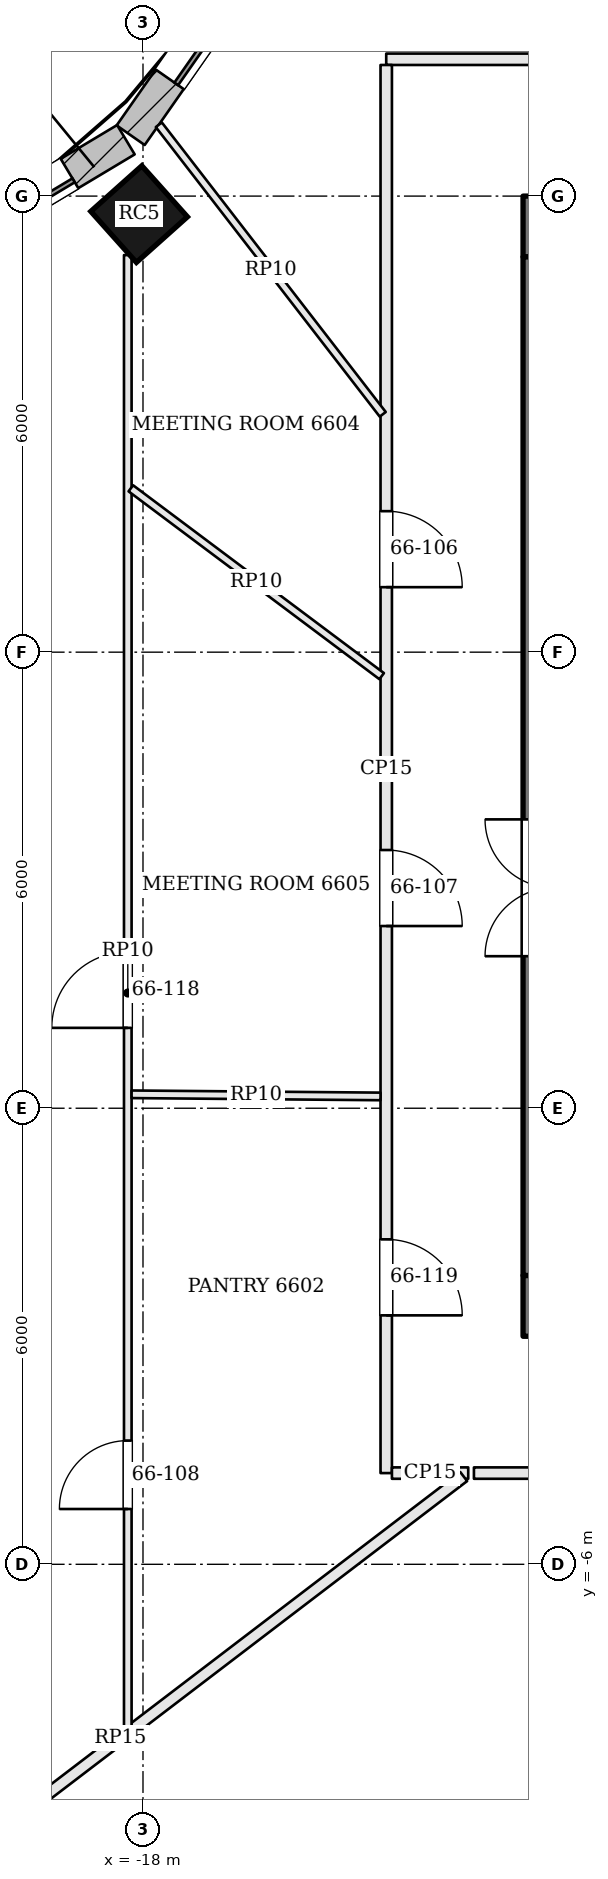
"""IFC4 building model, lengths in metres.
Left out: names, types, materials, properties, quantities, classifications, styles, units other than length and angle.
Written with IfcOpenShell. Run it as: python <this file> out.ifc"""

import sys

from ifc_helpers import new_model, si_unit, direction, frame, frame_2d, origin, origin_2d, place, context, subcontext, project, spatial, rectangle, extrude, element, fill, save


model = new_model("IFC4")
c1 = context("Model", 3, precision=1e-05, world=origin(), true_north=direction((0.0, 1.0)))
c2 = subcontext(c1, "Body", "Model", "MODEL_VIEW")
j1 = project(units=[si_unit("LENGTHUNIT", "METRE"), si_unit("PLANEANGLEUNIT", "RADIAN")], contexts=[c1])
p1 = place(None, origin())
s1 = spatial("IfcSite", under=j1, at=p1, CompositionType="ELEMENT")
p2 = place(p1, origin())
s2 = spatial("IfcBuilding", under=s1, at=p2, CompositionType="ELEMENT")
p3 = place(p2, frame((0.0, 0.0, 268.8)))
s3 = spatial("IfcBuildingStorey", under=s2, at=p3, CompositionType="ELEMENT", Elevation=268.8)
p4 = place(p3, frame((-13.0, 11.6, 0.0), z_axis=(0.0, 0.0, 1.0), x_axis=(1.0, 0.0, 0.0)))
e1 = element("IfcWall", 1, at=p4, inside=s3, PredefinedType="SHEAR", context=c2, shape_type="SweptSolid", body=[
    extrude(rectangle(XDim=26.0, YDim=0.8, at=frame_2d((13.0, 0.0))), origin(), (0.0, 0.0, 1.0), 3.9),
])
p5 = place(p4, frame((8.825, 0.0, 0.0)))
e2 = element("IfcOpeningElement", 2, at=p5, cuts=e1, PredefinedType="OPENING", context=c2, shape_type="SweptSolid", body=[
    extrude(rectangle(XDim=1.0, YDim=2.1, at=frame_2d((0.5, 1.05))), frame((0.0, 0.41, 0.0), z_axis=(0.0, -1.0, 0.0), x_axis=(1.0, 0.0, 0.0)), (0.0, 0.0, 1.0), 0.82),
])
p6 = place(p4, frame((11.825, 0.0, 0.0)))
e3 = element("IfcOpeningElement", 3, at=p6, cuts=e1, PredefinedType="OPENING", context=c2, shape_type="SweptSolid", body=[
    extrude(rectangle(XDim=0.7, YDim=2.1, at=frame_2d((0.35, 1.05))), frame((0.0, 0.41, 0.0), z_axis=(0.0, -1.0, 0.0), x_axis=(1.0, 0.0, 0.0)), (0.0, 0.0, 1.0), 0.82),
])
p7 = place(p4, frame((14.275, 0.0, 0.0)))
e4 = element("IfcOpeningElement", 4, at=p7, cuts=e1, PredefinedType="OPENING", context=c2, shape_type="SweptSolid", body=[
    extrude(rectangle(XDim=0.7, YDim=2.1, at=frame_2d((0.35, 1.05))), frame((0.0, 0.41, 0.0), z_axis=(0.0, -1.0, 0.0), x_axis=(1.0, 0.0, 0.0)), (0.0, 0.0, 1.0), 0.82),
])
p8 = place(p4, frame((16.175, 0.0, 0.0)))
e5 = element("IfcOpeningElement", 5, at=p8, cuts=e1, PredefinedType="OPENING", context=c2, shape_type="SweptSolid", body=[
    extrude(rectangle(XDim=1.0, YDim=2.1, at=frame_2d((0.5, 1.05))), frame((0.0, 0.41, 0.0), z_axis=(0.0, -1.0, 0.0), x_axis=(1.0, 0.0, 0.0)), (0.0, 0.0, 1.0), 0.82),
])
p9 = place(p3, frame((-13.0, -2.6, 0.0), z_axis=(0.0, 0.0, 1.0), x_axis=(1.0, 0.0, 0.0)))
e6 = element("IfcWall", 6, at=p9, inside=s3, PredefinedType="SHEAR", context=c2, shape_type="SweptSolid", body=[
    extrude(rectangle(XDim=26.0, YDim=0.8, at=frame_2d((13.0, 0.0))), origin(), (0.0, 0.0, 1.0), 3.9),
])
p10 = place(p9, frame((9.2, 0.0, 0.0)))
e7 = element("IfcOpeningElement", 7, at=p10, cuts=e6, PredefinedType="OPENING", context=c2, shape_type="SweptSolid", body=[
    extrude(rectangle(XDim=0.9, YDim=2.1, at=frame_2d((0.45, 1.05))), frame((0.0, 0.41, 0.0), z_axis=(0.0, -1.0, 0.0), x_axis=(1.0, 0.0, 0.0)), (0.0, 0.0, 1.0), 0.82),
])
p11 = place(p9, frame((12.3, 0.0, 0.0)))
e8 = element("IfcOpeningElement", 8, at=p11, cuts=e6, PredefinedType="OPENING", context=c2, shape_type="SweptSolid", body=[
    extrude(rectangle(XDim=0.9, YDim=2.1, at=frame_2d((0.45, 1.05))), frame((0.0, 0.41, 0.0), z_axis=(0.0, -1.0, 0.0), x_axis=(1.0, 0.0, 0.0)), (0.0, 0.0, 1.0), 0.82),
])
p12 = place(p9, frame((14.7, 0.0, 0.0)))
e9 = element("IfcOpeningElement", 9, at=p12, cuts=e6, PredefinedType="OPENING", context=c2, shape_type="SweptSolid", body=[
    extrude(rectangle(XDim=1.0, YDim=2.1, at=frame_2d((0.5, 1.05))), frame((0.0, 0.41, 0.0), z_axis=(0.0, -1.0, 0.0), x_axis=(1.0, 0.0, 0.0)), (0.0, 0.0, 1.0), 0.82),
])
p13 = place(p9, frame((16.55, 0.0, 0.0)))
e10 = element("IfcOpeningElement", 10, at=p13, cuts=e6, PredefinedType="OPENING", context=c2, shape_type="SweptSolid", body=[
    extrude(rectangle(XDim=0.9, YDim=2.1, at=frame_2d((0.45, 1.05))), frame((0.0, 0.41, 0.0), z_axis=(0.0, -1.0, 0.0), x_axis=(1.0, 0.0, 0.0)), (0.0, 0.0, 1.0), 0.82),
])
p14 = place(p3, frame((-12.6, -2.2, 0.0), z_axis=(0.0, 0.0, 1.0), x_axis=(0.0, 1.0, 0.0)))
e11 = element("IfcWall", 11, at=p14, inside=s3, PredefinedType="SHEAR", context=c2, shape_type="SweptSolid", body=[
    extrude(rectangle(XDim=13.4, YDim=0.8, at=frame_2d((6.7, 0.0))), origin(), (0.0, 0.0, 1.0), 3.9),
])
p15 = place(p14, frame((4.2, 0.0, 0.0)))
e12 = element("IfcOpeningElement", 12, at=p15, cuts=e11, PredefinedType="OPENING", context=c2, shape_type="SweptSolid", body=[
    extrude(rectangle(XDim=1.8, YDim=2.1, at=frame_2d((0.9, 1.05))), frame((0.0, 0.41, 0.0), z_axis=(0.0, -1.0, 0.0), x_axis=(1.0, 0.0, 0.0)), (0.0, 0.0, 1.0), 0.82),
])
p16 = place(p3, frame((-18.051, 11.763, -0.7), z_axis=(0.0, 0.0, 1.0), x_axis=(-0.7456420961, -0.66634665492, 0.0)))
e13 = element("IfcColumn", 13, at=p16, inside=s3, PredefinedType="COLUMN", context=c2, shape_type="SweptSolid", body=[
    extrude(rectangle(XDim=0.9, YDim=0.9, at=origin_2d()), origin(), (0.0, 0.0, 1.0), 4.6),
])
p17 = place(p3, frame((-15.931, 15.993, 0.0), z_axis=(0.0, 0.0, 1.0), x_axis=(-0.572923675708, -0.819608724828, 0.0)))
e14 = element("IfcWall", 14, at=p17, inside=s3, PredefinedType="SOLIDWALL", context=c2, shape_type="SweptSolid", body=[
    extrude(rectangle(XDim=3.895, YDim=0.45, at=frame_2d((1.947, 0.0))), origin(), (0.0, 0.0, 1.0), 3.7),
])
p18 = place(p17, frame((0.897, 0.0, 0.9)))
e15 = element("IfcOpeningElement", 15, at=p18, cuts=e14, PredefinedType="OPENING", context=c2, shape_type="SweptSolid", body=[
    extrude(rectangle(XDim=2.1, YDim=2.3, at=frame_2d((1.05, 1.15))), frame((0.0, 0.235, 0.0), z_axis=(0.0, -1.0, 0.0), x_axis=(1.0, 0.0, 0.0)), (0.0, 0.0, 1.0), 0.47),
])
p19 = place(p3, frame((-18.225, 12.742, 0.0), z_axis=(0.0, 0.0, 1.0), x_axis=(-0.857965073766, -0.513708022322, 0.0)))
e16 = element("IfcWall", 16, at=p19, inside=s3, PredefinedType="SOLIDWALL", context=c2, shape_type="SweptSolid", body=[
    extrude(rectangle(XDim=3.83, YDim=0.45, at=frame_2d((1.915, 0.0))), origin(), (0.0, 0.0, 1.0), 3.7),
])
p20 = place(p19, frame((0.865, 0.0, 0.9)))
e17 = element("IfcOpeningElement", 17, at=p20, cuts=e16, PredefinedType="OPENING", context=c2, shape_type="SweptSolid", body=[
    extrude(rectangle(XDim=2.1, YDim=2.3, at=frame_2d((1.05, 1.15))), frame((0.0, 0.235, 0.0), z_axis=(0.0, -1.0, 0.0), x_axis=(1.0, 0.0, 0.0)), (0.0, 0.0, 1.0), 0.47),
])
p21 = place(p3, frame((-8.977, 13.8, 0.0), z_axis=(0.0, 0.0, 1.0), x_axis=(-1.0, 0.0, 0.0)))
e18 = element("IfcWall", 18, at=p21, inside=s3, PredefinedType="PARTITIONING", context=c2, shape_type="SweptSolid", body=[
    extrude(rectangle(XDim=5.823, YDim=0.15, at=frame_2d((2.912, 0.0))), origin(), (0.0, 0.0, 1.0), 3.198),
])
p22 = place(p21, frame((1.75, 0.0, 0.0)))
e19 = element("IfcOpeningElement", 19, at=p22, cuts=e18, PredefinedType="OPENING", context=c2, shape_type="SweptSolid", body=[
    extrude(rectangle(XDim=1.8, YDim=2.1, at=frame_2d((0.9, 1.05))), frame((0.0, 0.085, 0.0), z_axis=(0.0, -1.0, 0.0), x_axis=(1.0, 0.0, 0.0)), (0.0, 0.0, 1.0), 0.17),
])
p23 = place(p3, frame((-14.8, 13.725, 0.0), z_axis=(0.0, 0.0, 1.0), x_axis=(0.0, -1.0, 0.0)))
e20 = element("IfcWall", 20, at=p23, inside=s3, PredefinedType="PARTITIONING", context=c2, shape_type="SweptSolid", body=[
    extrude(rectangle(XDim=18.525, YDim=0.15, at=frame_2d((9.263, 0.0))), origin(), (0.0, 0.0, 1.0), 3.198),
])
p24 = place(p23, frame((5.87, 0.0, 0.0)))
e21 = element("IfcOpeningElement", 21, at=p24, cuts=e20, PredefinedType="OPENING", context=c2, shape_type="SweptSolid", body=[
    extrude(rectangle(XDim=1.0, YDim=2.4, at=frame_2d((0.5, 1.2))), frame((0.0, 0.085, 0.0), z_axis=(0.0, -1.0, 0.0), x_axis=(1.0, 0.0, 0.0)), (0.0, 0.0, 1.0), 0.17),
])
p25 = place(p23, frame((10.328, 0.0, 0.0)))
e22 = element("IfcOpeningElement", 22, at=p25, cuts=e20, PredefinedType="OPENING", context=c2, shape_type="SweptSolid", body=[
    extrude(rectangle(XDim=1.0, YDim=2.4, at=frame_2d((0.5, 1.2))), frame((0.0, 0.085, 0.0), z_axis=(0.0, -1.0, 0.0), x_axis=(1.0, 0.0, 0.0)), (0.0, 0.0, 1.0), 0.17),
])
p26 = place(p23, frame((15.45, 0.0, 0.0)))
e23 = element("IfcOpeningElement", 23, at=p26, cuts=e20, PredefinedType="OPENING", context=c2, shape_type="SweptSolid", body=[
    extrude(rectangle(XDim=1.0, YDim=2.1, at=frame_2d((0.5, 1.05))), frame((0.0, 0.085, 0.0), z_axis=(0.0, -1.0, 0.0), x_axis=(1.0, 0.0, 0.0)), (0.0, 0.0, 1.0), 0.17),
])
p27 = place(p3, frame((-14.725, -4.8, 0.0), z_axis=(0.0, 0.0, 1.0), x_axis=(1.0, 0.0, 0.0)))
e24 = element("IfcWall", 24, at=p27, inside=s3, PredefinedType="PARTITIONING", context=c2, shape_type="SweptSolid", body=[
    extrude(rectangle(XDim=1.004, YDim=0.15, at=frame_2d((0.502, 0.0))), origin(), (0.0, 0.0, 1.0), 3.198),
])
p28 = place(p3, frame((-22.812, -11.738, 0.0), z_axis=(0.0, 0.0, 1.0), x_axis=(0.794974700279, 0.606642584984, 0.0)))
e25 = element("IfcWall", 25, at=p28, inside=s3, PredefinedType="PARTITIONING", context=c2, shape_type="SweptSolid", body=[
    extrude(rectangle(XDim=11.361, YDim=0.15, at=frame_2d((5.681, 0.0))), origin(), (0.0, 0.0, 1.0), 3.184),
])
p29 = place(p3, frame((-13.646, -4.8, 0.0), z_axis=(0.0, 0.0, 1.0), x_axis=(1.0, 0.0, 0.0)))
e26 = element("IfcWall", 26, at=p29, inside=s3, PredefinedType="PARTITIONING", context=c2, shape_type="SweptSolid", body=[
    extrude(rectangle(XDim=19.716, YDim=0.15, at=frame_2d((9.858, 0.0))), origin(), (0.0, 0.0, 1.0), 3.198),
])
p30 = place(p29, frame((8.921, 0.0, 0.0)))
e27 = element("IfcOpeningElement", 27, at=p30, cuts=e26, PredefinedType="OPENING", context=c2, shape_type="SweptSolid", body=[
    extrude(rectangle(XDim=1.8, YDim=2.1, at=frame_2d((0.9, 1.05))), frame((0.0, 0.085, 0.0), z_axis=(0.0, -1.0, 0.0), x_axis=(1.0, 0.0, 0.0)), (0.0, 0.0, 1.0), 0.17),
])
p31 = place(p3, frame((-18.2, -8.193, 0.0), z_axis=(0.0, 0.0, 1.0), x_axis=(0.0, 1.0, 0.0)))
e28 = element("IfcWall", 28, at=p31, inside=s3, PredefinedType="PARTITIONING", context=c2, shape_type="SweptSolid", body=[
    extrude(rectangle(XDim=19.417, YDim=0.1, at=frame_2d((9.708, 0.0))), origin(), (0.0, 0.0, 1.0), 3.184),
])
p32 = place(p31, frame((2.92, 0.0, 0.0)))
e29 = element("IfcOpeningElement", 29, at=p32, cuts=e28, PredefinedType="OPENING", context=c2, shape_type="SweptSolid", body=[
    extrude(rectangle(XDim=0.9, YDim=2.1, at=frame_2d((0.45, 1.05))), frame((0.0, 0.06, 0.0), z_axis=(0.0, -1.0, 0.0), x_axis=(1.0, 0.0, 0.0)), (0.0, 0.0, 1.0), 0.12),
])
p33 = place(p31, frame((9.25, 0.0, 0.0)))
e30 = element("IfcOpeningElement", 30, at=p33, cuts=e28, PredefinedType="OPENING", context=c2, shape_type="SweptSolid", body=[
    extrude(rectangle(XDim=1.0, YDim=2.4, at=frame_2d((0.5, 1.2))), frame((0.0, 0.06, 0.0), z_axis=(0.0, -1.0, 0.0), x_axis=(1.0, 0.0, 0.0)), (0.0, 0.0, 1.0), 0.12),
])
p34 = place(p3, frame((-14.846, 9.129, 0.0), z_axis=(0.0, 0.0, 1.0), x_axis=(-0.611737488733, 0.791060835132, 0.0)))
e31 = element("IfcWall", 31, at=p34, inside=s3, PredefinedType="PARTITIONING", context=c2, shape_type="SweptSolid", body=[
    extrude(rectangle(XDim=4.815, YDim=0.1, at=frame_2d((2.408, 0.0))), origin(), (0.0, 0.0, 1.0), 3.184),
])
p35 = place(p3, frame((-14.86, 5.685, 0.0), z_axis=(0.0, 0.0, 1.0), x_axis=(-0.800426186609, 0.599431330338, 0.0)))
e32 = element("IfcWall", 32, at=p35, inside=s3, PredefinedType="PARTITIONING", context=c2, shape_type="SweptSolid", body=[
    extrude(rectangle(XDim=4.123, YDim=0.1, at=frame_2d((2.061, 0.0))), origin(), (0.0, 0.0, 1.0), 3.184),
])
p36 = place(p3, frame((-14.875, 0.155, 0.0), z_axis=(0.0, 0.0, 1.0), x_axis=(-0.999962610899, 0.008647358198, 0.0)))
e33 = element("IfcWall", 33, at=p36, inside=s3, PredefinedType="PARTITIONING", context=c2, shape_type="SweptSolid", body=[
    extrude(rectangle(XDim=3.275, YDim=0.1, at=frame_2d((1.638, 0.0))), origin(), (0.0, 0.0, 1.0), 3.184),
])
p37 = place(p18, origin())
e34 = element("IfcWindow", 34, at=p37, inside=s3, PartitioningType="SINGLE_PANEL", PredefinedType="WINDOW", context=c2, shape_type="SweptSolid", body=[
    extrude(rectangle(XDim=2.1, YDim=2.3, at=frame_2d((1.05, 1.15))), frame((0.0, 0.135, 0.0), z_axis=(0.0, -1.0, 0.0), x_axis=(1.0, 0.0, 0.0)), (0.0, 0.0, 1.0), 0.06),
])
fill(e15, e34)
p38 = place(p20, origin())
e35 = element("IfcWindow", 35, at=p38, inside=s3, PartitioningType="SINGLE_PANEL", PredefinedType="WINDOW", context=c2, shape_type="SweptSolid", body=[
    extrude(rectangle(XDim=2.1, YDim=2.3, at=frame_2d((1.05, 1.15))), frame((0.0, 0.135, 0.0), z_axis=(0.0, -1.0, 0.0), x_axis=(1.0, 0.0, 0.0)), (0.0, 0.0, 1.0), 0.06),
])
fill(e17, e35)
p39 = place(p24, origin())
e36 = element("IfcDoor", 36, at=p39, inside=s3, OperationType="SINGLE_SWING_RIGHT", PredefinedType="DOOR", context=c2, shape_type="SweptSolid", body=[
    extrude(rectangle(XDim=1.0, YDim=2.4, at=frame_2d((0.5, 1.2))), frame((0.0, 0.025, 0.0), z_axis=(0.0, -1.0, 0.0), x_axis=(1.0, 0.0, 0.0)), (0.0, 0.0, 1.0), 0.05),
])
fill(e21, e36)
p40 = place(p25, origin())
e37 = element("IfcDoor", 37, at=p40, inside=s3, OperationType="SINGLE_SWING_RIGHT", PredefinedType="DOOR", context=c2, shape_type="SweptSolid", body=[
    extrude(rectangle(XDim=1.0, YDim=2.4, at=frame_2d((0.5, 1.2))), frame((0.0, 0.025, 0.0), z_axis=(0.0, -1.0, 0.0), x_axis=(1.0, 0.0, 0.0)), (0.0, 0.0, 1.0), 0.05),
])
fill(e22, e37)
p41 = place(p32, origin())
e38 = element("IfcDoor", 38, at=p41, inside=s3, OperationType="SINGLE_SWING_LEFT", PredefinedType="DOOR", context=c2, shape_type="SweptSolid", body=[
    extrude(rectangle(XDim=0.9, YDim=2.1, at=frame_2d((0.45, 1.05))), frame((0.0, 0.025, 0.0), z_axis=(0.0, -1.0, 0.0), x_axis=(1.0, 0.0, 0.0)), (0.0, 0.0, 1.0), 0.05),
])
fill(e29, e38)
p42 = place(p33, origin())
e39 = element("IfcDoor", 39, at=p42, inside=s3, OperationType="SINGLE_SWING_LEFT", PredefinedType="DOOR", context=c2, shape_type="SweptSolid", body=[
    extrude(rectangle(XDim=1.0, YDim=2.4, at=frame_2d((0.5, 1.2))), frame((0.0, 0.025, 0.0), z_axis=(0.0, -1.0, 0.0), x_axis=(1.0, 0.0, 0.0)), (0.0, 0.0, 1.0), 0.05),
])
fill(e30, e39)
p43 = place(p26, origin())
e40 = element("IfcDoor", 40, at=p43, inside=s3, OperationType="SINGLE_SWING_RIGHT", PredefinedType="DOOR", context=c2, shape_type="SweptSolid", body=[
    extrude(rectangle(XDim=1.0, YDim=2.1, at=frame_2d((0.5, 1.05))), frame((0.0, 0.025, 0.0), z_axis=(0.0, -1.0, 0.0), x_axis=(1.0, 0.0, 0.0)), (0.0, 0.0, 1.0), 0.05),
])
fill(e23, e40)
save(model, sys.argv[1])
